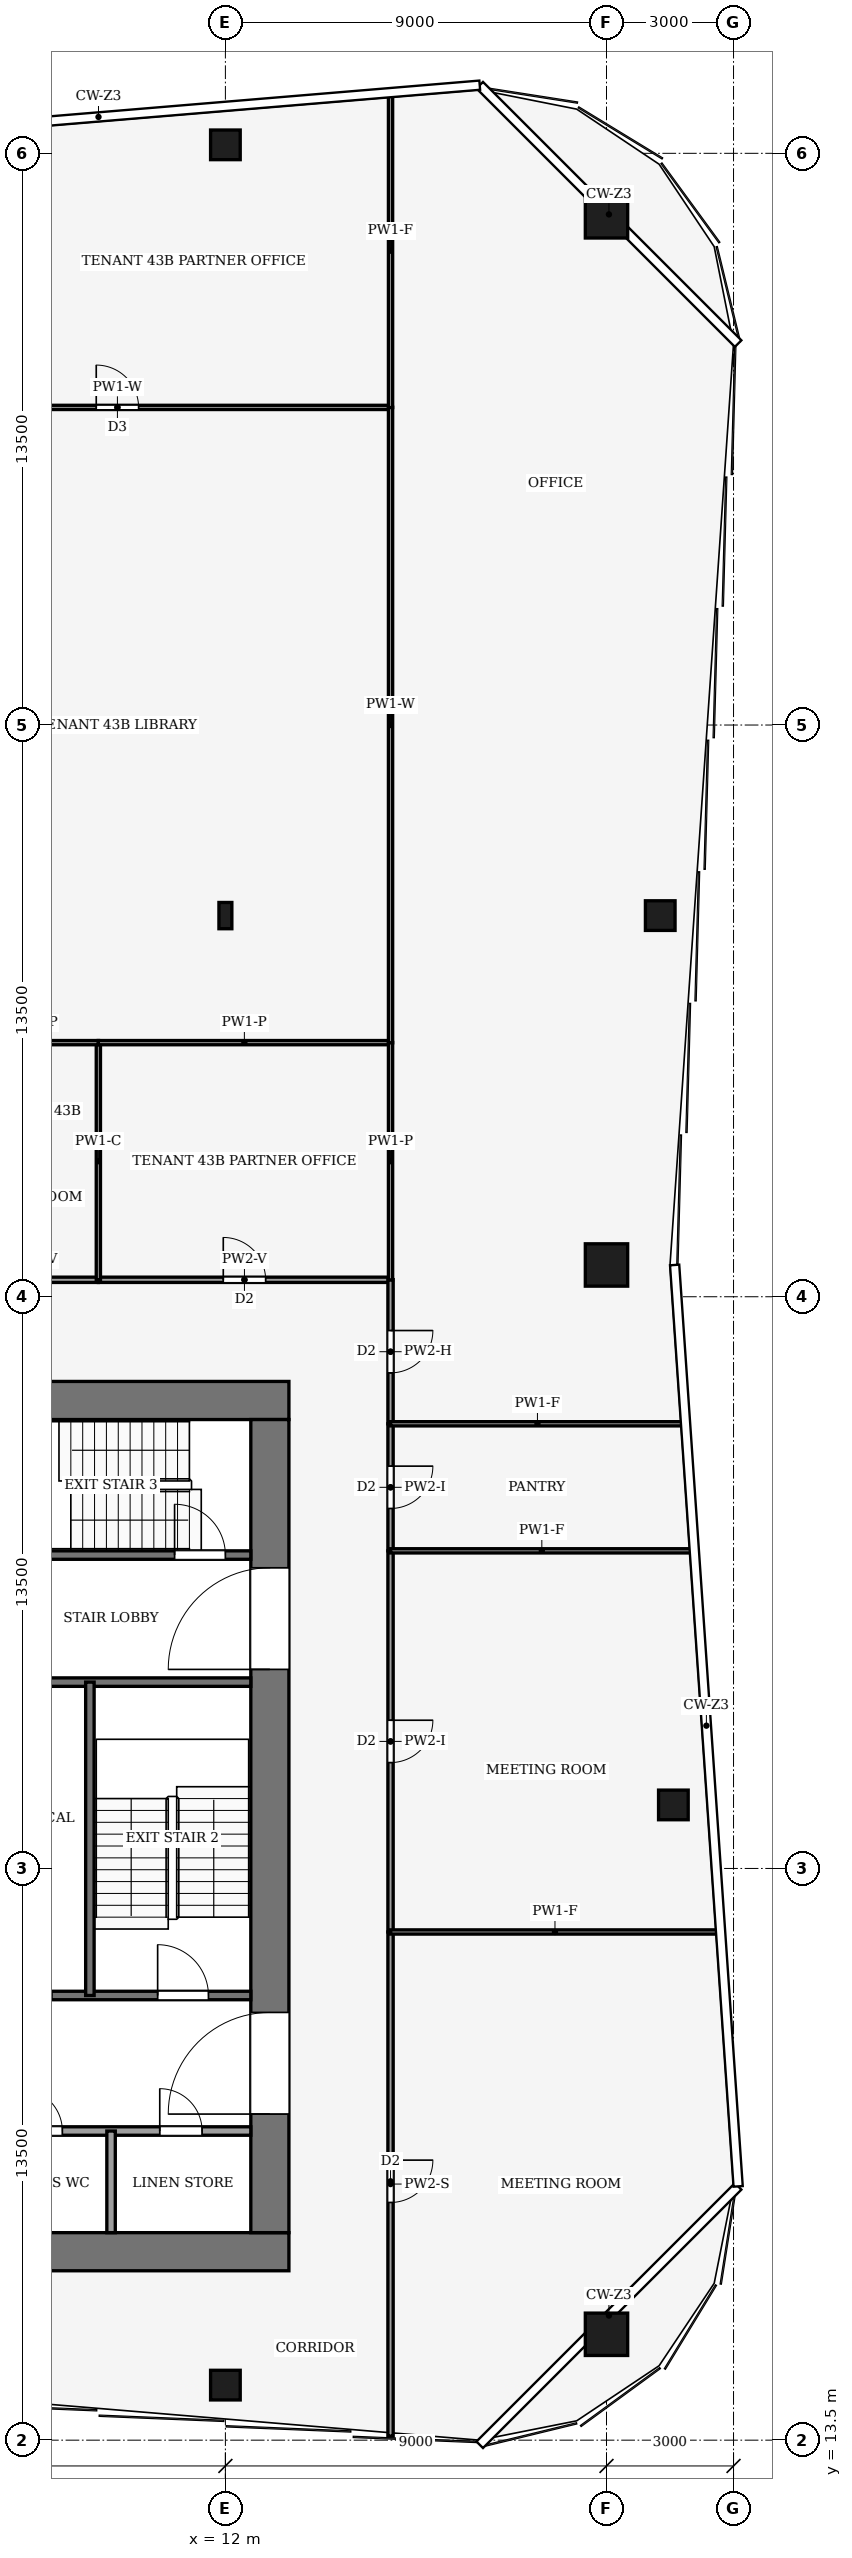
"""IFC4 building model, lengths in metres.
Left out: names, types, materials, properties, quantities, classifications, styles, units other than length and angle.
Written with IfcOpenShell. Run it as: python <this file> out.ifc"""

import sys

from ifc_helpers import new_model, si_unit, direction, frame, frame_2d, origin, origin_2d, place, context, subcontext, project, spatial, rectangle, hollow_rectangle, i_section, extrude, element, fill, save


model = new_model("IFC4")
c1 = context("Model", 3, precision=1e-05, world=origin(), true_north=direction((0.0, 1.0)))
c2 = subcontext(c1, "Body", "Model", "MODEL_VIEW")
j1 = project(units=[si_unit("LENGTHUNIT", "METRE"), si_unit("PLANEANGLEUNIT", "RADIAN")], contexts=[c1])
p1 = place(None, origin())
s1 = spatial("IfcSite", under=j1, at=p1, CompositionType="ELEMENT")
p2 = place(p1, origin())
s2 = spatial("IfcBuilding", under=s1, at=p2, CompositionType="ELEMENT")
p3 = place(p2, frame((0.0, 0.0, 190.0)))
s3 = spatial("IfcBuildingStorey", under=s2, at=p3, CompositionType="ELEMENT", Elevation=190.0)
for number, where, z_axis, x_axis in (
    (1, (-13.5, 17.95, -0.13), (0.0, 0.0, 1.0), (1.0, 0.0, 0.0)),
    (2, (-13.5, 38.05, -0.13), (0.0, 0.0, 1.0), (1.0, 0.0, 0.0)),
):
    element("IfcWall", number, at=place(p3, frame(where, z_axis=z_axis, x_axis=x_axis)), inside=s3, PredefinedType="SHEAR", context=c2, shape_type="SweptSolid", body=[
        extrude(rectangle(XDim=27.0, YDim=0.9, at=frame_2d((13.5, 0.0))), origin(), (0.0, 0.0, 1.0), 4.0),
    ])
p4 = place(p3, frame((13.05, 18.4, -0.13), z_axis=(0.0, 0.0, 1.0), x_axis=(0.0, 1.0, 0.0)))
e3 = element("IfcWall", 3, at=p4, inside=s3, PredefinedType="SHEAR", context=c2, shape_type="SweptSolid", body=[
    extrude(rectangle(XDim=19.2, YDim=0.9, at=frame_2d((9.6, 0.0))), origin(), (0.0, 0.0, 1.0), 4.0),
])
p5 = place(p4, frame((2.8, 0.0, 0.13)))
e4 = element("IfcOpeningElement", 4, at=p5, cuts=e3, PredefinedType="OPENING", context=c2, shape_type="SweptSolid", body=[
    extrude(rectangle(XDim=2.4, YDim=2.4, at=frame_2d((1.2, 1.2))), frame((0.0, 0.46, 0.0), z_axis=(0.0, -1.0, 0.0), x_axis=(1.0, 0.0, 0.0)), (0.0, 0.0, 1.0), 0.92),
])
p6 = place(p4, frame((13.3, 0.0, 0.13)))
e5 = element("IfcOpeningElement", 5, at=p6, cuts=e3, PredefinedType="OPENING", context=c2, shape_type="SweptSolid", body=[
    extrude(rectangle(XDim=2.4, YDim=2.4, at=frame_2d((1.2, 1.2))), frame((0.0, 0.46, 0.0), z_axis=(0.0, -1.0, 0.0), x_axis=(1.0, 0.0, 0.0)), (0.0, 0.0, 1.0), 0.92),
])
for number, where, z_axis, x_axis in (
    (6, (21.0, 66.0, 0.0), (0.0, 0.0, 1.0), (1.0, 0.0, 0.0)),
    (7, (21.0, 41.25, 0.0), (0.0, 0.0, 1.0), (1.0, 0.0, 0.0)),
    (8, (21.0, 16.0, 0.0), (0.0, 0.0, 1.0), (1.0, 0.0, 0.0)),
):
    element("IfcColumn", number, at=place(p3, frame(where, z_axis=z_axis, x_axis=x_axis)), inside=s3, PredefinedType="COLUMN", context=c2, shape_type="SweptSolid", body=[
        extrude(hollow_rectangle(XDim=1.0, YDim=1.0, WallThickness=0.06, at=origin_2d()), origin(), (0.0, 0.0, 1.0), 4.0),
    ])
for number, where, z_axis, x_axis in (
    (9, (12.0, 67.7, 0.0), (0.0, 0.0, 1.0), (1.0, 0.0, 0.0)),
    (10, (12.0, 14.8, 0.0), (0.0, 0.0, 1.0), (1.0, 0.0, 0.0)),
    (11, (22.579, 28.5, 0.0), (0.0, 0.0, 1.0), (1.0, 0.0, 0.0)),
    (12, (22.269, 49.5, 0.0), (0.0, 0.0, 1.0), (1.0, 0.0, 0.0)),
):
    element("IfcColumn", number, at=place(p3, frame(where, z_axis=z_axis, x_axis=x_axis)), inside=s3, PredefinedType="COLUMN", context=c2, shape_type="SweptSolid", body=[
        extrude(hollow_rectangle(XDim=0.7, YDim=0.7, WallThickness=0.03, at=origin_2d()), origin(), (0.0, 0.0, 1.0), 4.0),
    ])
p7 = place(p3, frame((12.0, 49.5, 0.0), z_axis=(0.0, 0.0, 1.0), x_axis=(1.0, 0.0, 0.0)))
e13 = element("IfcColumn", 13, at=p7, inside=s3, PredefinedType="COLUMN", context=c2, shape_type="SweptSolid", body=[
    extrude(i_section(OverallWidth=0.305, OverallDepth=0.62, WebThickness=0.021, FlangeThickness=0.04, FilletRadius=0.027, at=origin_2d()), origin(), (0.0, 0.0, 1.0), 4.0),
])
p8 = place(p3, frame((6.0, 20.8, 0.0), z_axis=(0.0, 0.0, 1.0), x_axis=(1.0, 0.0, 0.0)))
e14 = element("IfcWall", 14, at=p8, inside=s3, PredefinedType="PARTITIONING", context=c2, shape_type="SweptSolid", body=[
    extrude(rectangle(XDim=6.6, YDim=0.2, at=frame_2d((3.3, 0.0))), origin(), (0.0, 0.0, 1.0), 3.87),
])
p9 = place(p8, frame((1.15, 0.0, 0.0)))
e15 = element("IfcOpeningElement", 15, at=p9, cuts=e14, PredefinedType="OPENING", context=c2, shape_type="SweptSolid", body=[
    extrude(rectangle(XDim=1.0, YDim=2.1, at=frame_2d((0.5, 1.05))), frame((0.0, 0.11, 0.0), z_axis=(0.0, -1.0, 0.0), x_axis=(1.0, 0.0, 0.0)), (0.0, 0.0, 1.0), 0.22),
])
p10 = place(p8, frame((4.45, 0.0, 0.0)))
e16 = element("IfcOpeningElement", 16, at=p10, cuts=e14, PredefinedType="OPENING", context=c2, shape_type="SweptSolid", body=[
    extrude(rectangle(XDim=1.0, YDim=2.1, at=frame_2d((0.5, 1.05))), frame((0.0, 0.11, 0.0), z_axis=(0.0, -1.0, 0.0), x_axis=(1.0, 0.0, 0.0)), (0.0, 0.0, 1.0), 0.22),
])
p11 = place(p3, frame((6.0, 24.0, 0.0), z_axis=(0.0, 0.0, 1.0), x_axis=(1.0, 0.0, 0.0)))
e17 = element("IfcWall", 17, at=p11, inside=s3, PredefinedType="PARTITIONING", context=c2, shape_type="SweptSolid", body=[
    extrude(rectangle(XDim=6.6, YDim=0.2, at=frame_2d((3.3, 0.0))), origin(), (0.0, 0.0, 1.0), 3.87),
])
p12 = place(p11, frame((0.9, 0.0, 0.0)))
e18 = element("IfcOpeningElement", 18, at=p12, cuts=e17, PredefinedType="OPENING", context=c2, shape_type="SweptSolid", body=[
    extrude(rectangle(XDim=1.0, YDim=2.1, at=frame_2d((0.5, 1.05))), frame((0.0, 0.11, 0.0), z_axis=(0.0, -1.0, 0.0), x_axis=(1.0, 0.0, 0.0)), (0.0, 0.0, 1.0), 0.22),
])
p13 = place(p11, frame((4.4, 0.0, 0.0)))
e19 = element("IfcOpeningElement", 19, at=p13, cuts=e17, PredefinedType="OPENING", context=c2, shape_type="SweptSolid", body=[
    extrude(rectangle(XDim=1.2, YDim=2.2, at=frame_2d((0.6, 1.1))), frame((0.0, 0.11, 0.0), z_axis=(0.0, -1.0, 0.0), x_axis=(1.0, 0.0, 0.0)), (0.0, 0.0, 1.0), 0.22),
])
p14 = place(p3, frame((6.0, 31.4, 0.0), z_axis=(0.0, 0.0, 1.0), x_axis=(1.0, 0.0, 0.0)))
e20 = element("IfcWall", 20, at=p14, inside=s3, PredefinedType="PARTITIONING", context=c2, shape_type="SweptSolid", body=[
    extrude(rectangle(XDim=6.6, YDim=0.2, at=frame_2d((3.3, 0.0))), origin(), (0.0, 0.0, 1.0), 3.87),
])
p15 = place(p3, frame((6.0, 34.4, 0.0), z_axis=(0.0, 0.0, 1.0), x_axis=(1.0, 0.0, 0.0)))
e21 = element("IfcWall", 21, at=p15, inside=s3, PredefinedType="PARTITIONING", context=c2, shape_type="SweptSolid", body=[
    extrude(rectangle(XDim=6.6, YDim=0.2, at=frame_2d((3.3, 0.0))), origin(), (0.0, 0.0, 1.0), 3.87),
])
p16 = place(p15, frame((4.8, 0.0, 0.0)))
e22 = element("IfcOpeningElement", 22, at=p16, cuts=e21, PredefinedType="OPENING", context=c2, shape_type="SweptSolid", body=[
    extrude(rectangle(XDim=1.2, YDim=2.2, at=frame_2d((0.6, 1.1))), frame((0.0, 0.11, 0.0), z_axis=(0.0, -1.0, 0.0), x_axis=(1.0, 0.0, 0.0)), (0.0, 0.0, 1.0), 0.22),
])
p17 = place(p3, frame((8.8, 24.0, 0.0), z_axis=(0.0, 0.0, 1.0), x_axis=(0.0, 1.0, 0.0)))
e23 = element("IfcWall", 23, at=p17, inside=s3, PredefinedType="PARTITIONING", context=c2, shape_type="SweptSolid", body=[
    extrude(rectangle(XDim=7.4, YDim=0.2, at=frame_2d((3.7, 0.0))), origin(), (0.0, 0.0, 1.0), 3.87),
])
p18 = place(p3, frame((9.3, 18.4, 0.0), z_axis=(0.0, 0.0, 1.0), x_axis=(0.0, 1.0, 0.0)))
e24 = element("IfcWall", 24, at=p18, inside=s3, PredefinedType="PARTITIONING", context=c2, shape_type="SweptSolid", body=[
    extrude(rectangle(XDim=2.4, YDim=0.2, at=frame_2d((1.2, 0.0))), origin(), (0.0, 0.0, 1.0), 3.87),
])
p19 = place(p3, frame((9.0, 40.9, 0.0), z_axis=(0.0, 0.0, 1.0), x_axis=(-1.0, 0.0, 0.0)))
e25 = element("IfcWall", 25, at=p19, inside=s3, PredefinedType="PARTITIONING", context=c2, shape_type="SweptSolid", body=[
    extrude(rectangle(XDim=3.0, YDim=0.125, at=frame_2d((1.5, 0.0))), origin(), (0.0, 0.0, 1.0), 3.44),
])
p20 = place(p3, frame((9.0, 40.9, 0.0), z_axis=(0.0, 0.0, 1.0), x_axis=(1.0, 0.0, 0.0)))
e26 = element("IfcWall", 26, at=p20, inside=s3, PredefinedType="PARTITIONING", context=c2, shape_type="SweptSolid", body=[
    extrude(rectangle(XDim=6.9, YDim=0.125, at=frame_2d((3.45, 0.0))), origin(), (0.0, 0.0, 1.0), 3.44),
])
p21 = place(p20, frame((2.95, 0.0, 0.0)))
e27 = element("IfcOpeningElement", 27, at=p21, cuts=e26, PredefinedType="OPENING", context=c2, shape_type="SweptSolid", body=[
    extrude(rectangle(XDim=1.0, YDim=2.1, at=frame_2d((0.5, 1.05))), frame((0.0, 0.073, 0.0), z_axis=(0.0, -1.0, 0.0), x_axis=(1.0, 0.0, 0.0)), (0.0, 0.0, 1.0), 0.145),
])
p22 = place(p3, frame((15.9, 25.5, 0.0), z_axis=(0.0, 0.0, 1.0), x_axis=(0.0, -1.0, 0.0)))
e28 = element("IfcWall", 28, at=p22, inside=s3, PredefinedType="PARTITIONING", context=c2, shape_type="SweptSolid", body=[
    extrude(rectangle(XDim=11.905, YDim=0.125, at=frame_2d((5.953, 0.0))), origin(), (0.0, 0.0, 1.0), 3.04),
])
p23 = place(p22, frame((5.387, 0.0, 0.0)))
e29 = element("IfcOpeningElement", 29, at=p23, cuts=e28, PredefinedType="OPENING", context=c2, shape_type="SweptSolid", body=[
    extrude(rectangle(XDim=1.0, YDim=2.1, at=frame_2d((0.5, 1.05))), frame((0.0, 0.073, 0.0), z_axis=(0.0, -1.0, 0.0), x_axis=(1.0, 0.0, 0.0)), (0.0, 0.0, 1.0), 0.145),
])
p24 = place(p3, frame((15.9, 34.5, 0.0), z_axis=(0.0, 0.0, 1.0), x_axis=(0.0, -1.0, 0.0)))
e30 = element("IfcWall", 30, at=p24, inside=s3, PredefinedType="PARTITIONING", context=c2, shape_type="SweptSolid", body=[
    extrude(rectangle(XDim=9.0, YDim=0.125, at=frame_2d((4.5, 0.0))), origin(), (0.0, 0.0, 1.0), 3.48),
])
p25 = place(p24, frame((4.0, 0.0, 0.0)))
e31 = element("IfcOpeningElement", 31, at=p25, cuts=e30, PredefinedType="OPENING", context=c2, shape_type="SweptSolid", body=[
    extrude(rectangle(XDim=1.0, YDim=2.1, at=frame_2d((0.5, 1.05))), frame((0.0, 0.073, 0.0), z_axis=(0.0, -1.0, 0.0), x_axis=(1.0, 0.0, 0.0)), (0.0, 0.0, 1.0), 0.145),
])
p26 = place(p3, frame((15.9, 37.5, 0.0), z_axis=(0.0, 0.0, 1.0), x_axis=(0.0, -1.0, 0.0)))
e32 = element("IfcWall", 32, at=p26, inside=s3, PredefinedType="PARTITIONING", context=c2, shape_type="SweptSolid", body=[
    extrude(rectangle(XDim=3.0, YDim=0.125, at=frame_2d((1.5, 0.0))), origin(), (0.0, 0.0, 1.0), 3.48),
])
p27 = place(p26, frame((1.0, 0.0, 0.0)))
e33 = element("IfcOpeningElement", 33, at=p27, cuts=e32, PredefinedType="OPENING", context=c2, shape_type="SweptSolid", body=[
    extrude(rectangle(XDim=1.0, YDim=2.1, at=frame_2d((0.5, 1.05))), frame((0.0, 0.073, 0.0), z_axis=(0.0, -1.0, 0.0), x_axis=(1.0, 0.0, 0.0)), (0.0, 0.0, 1.0), 0.145),
])
p28 = place(p3, frame((15.9, 40.904, 0.0), z_axis=(0.0, 0.0, 1.0), x_axis=(0.0, -1.0, 0.0)))
e34 = element("IfcWall", 34, at=p28, inside=s3, PredefinedType="PARTITIONING", context=c2, shape_type="SweptSolid", body=[
    extrude(rectangle(XDim=3.404, YDim=0.125, at=frame_2d((1.702, 0.0))), origin(), (0.0, 0.0, 1.0), 3.14),
])
p29 = place(p28, frame((1.202, 0.0, 0.0)))
e35 = element("IfcOpeningElement", 35, at=p29, cuts=e34, PredefinedType="OPENING", context=c2, shape_type="SweptSolid", body=[
    extrude(rectangle(XDim=1.0, YDim=2.1, at=frame_2d((0.5, 1.05))), frame((0.0, 0.073, 0.0), z_axis=(0.0, -1.0, 0.0), x_axis=(1.0, 0.0, 0.0)), (0.0, 0.0, 1.0), 0.145),
])
p30 = place(p3, frame((9.0, 40.9, 0.0), z_axis=(0.0, 0.0, 1.0), x_axis=(0.0, 1.0, 0.0)))
e36 = element("IfcWall", 36, at=p30, inside=s3, PredefinedType="PARTITIONING", context=c2, shape_type="SweptSolid", body=[
    extrude(rectangle(XDim=5.6, YDim=0.1, at=frame_2d((2.8, 0.0))), origin(), (0.0, 0.0, 1.0), 3.87),
])
p31 = place(p3, frame((9.004, 46.5, 0.0), z_axis=(0.0, 0.0, 1.0), x_axis=(-1.0, 0.0, 0.0)))
e37 = element("IfcWall", 37, at=p31, inside=s3, PredefinedType="PARTITIONING", context=c2, shape_type="SweptSolid", body=[
    extrude(rectangle(XDim=3.008, YDim=0.1, at=frame_2d((1.504, 0.0))), origin(), (0.0, 0.0, 1.0), 3.44),
])
p32 = place(p3, frame((15.9, 46.5, 0.0), z_axis=(0.0, 0.0, 1.0), x_axis=(-1.0, 0.0, 0.0)))
e38 = element("IfcWall", 38, at=p32, inside=s3, PredefinedType="PARTITIONING", context=c2, shape_type="SweptSolid", body=[
    extrude(rectangle(XDim=6.904, YDim=0.1, at=frame_2d((3.452, 0.0))), origin(), (0.0, 0.0, 1.0), 3.44),
])
p33 = place(p3, frame((15.9, 40.896, 0.0), z_axis=(0.0, 0.0, 1.0), x_axis=(0.0, 1.0, 0.0)))
e39 = element("IfcWall", 39, at=p33, inside=s3, PredefinedType="PARTITIONING", context=c2, shape_type="SweptSolid", body=[
    extrude(rectangle(XDim=5.608, YDim=0.1, at=frame_2d((2.804, 0.0))), origin(), (0.0, 0.0, 1.0), 3.44),
])
p34 = place(p3, frame((3.0, 61.5, 0.0), z_axis=(0.0, 0.0, 1.0), x_axis=(1.0, 0.0, 0.0)))
e40 = element("IfcWall", 40, at=p34, inside=s3, PredefinedType="PARTITIONING", context=c2, shape_type="SweptSolid", body=[
    extrude(rectangle(XDim=12.9, YDim=0.1, at=frame_2d((6.45, 0.0))), origin(), (0.0, 0.0, 1.0), 3.24),
])
p35 = place(p34, frame((5.95, 0.0, 0.0)))
e41 = element("IfcOpeningElement", 41, at=p35, cuts=e40, PredefinedType="OPENING", context=c2, shape_type="SweptSolid", body=[
    extrude(rectangle(XDim=1.0, YDim=2.1, at=frame_2d((0.5, 1.05))), frame((0.0, 0.06, 0.0), z_axis=(0.0, -1.0, 0.0), x_axis=(1.0, 0.0, 0.0)), (0.0, 0.0, 1.0), 0.12),
])
p36 = place(p3, frame((15.9, 46.496, 0.0), z_axis=(0.0, 0.0, 1.0), x_axis=(0.0, 1.0, 0.0)))
e42 = element("IfcWall", 42, at=p36, inside=s3, PredefinedType="PARTITIONING", context=c2, shape_type="SweptSolid", body=[
    extrude(rectangle(XDim=15.008, YDim=0.1, at=frame_2d((7.504, 0.0))), origin(), (0.0, 0.0, 1.0), 3.24),
])
p37 = place(p3, frame((15.9, 61.496, 0.0), z_axis=(0.0, 0.0, 1.0), x_axis=(0.0, 1.0, 0.0)))
e43 = element("IfcWall", 43, at=p37, inside=s3, PredefinedType="PARTITIONING", context=c2, shape_type="SweptSolid", body=[
    extrude(rectangle(XDim=7.409, YDim=0.1, at=frame_2d((3.705, 0.0))), origin(), (0.0, 0.0, 1.0), 3.04),
])
p38 = place(p3, frame((23.666, 25.5, 0.0), z_axis=(0.0, 0.0, 1.0), x_axis=(-1.0, 0.0, 0.0)))
e44 = element("IfcWall", 44, at=p38, inside=s3, PredefinedType="PARTITIONING", context=c2, shape_type="SweptSolid", body=[
    extrude(rectangle(XDim=7.766, YDim=0.1, at=frame_2d((3.883, 0.0))), origin(), (0.0, 0.0, 1.0), 3.04),
])
p39 = place(p3, frame((23.045, 34.5, 0.0), z_axis=(0.0, 0.0, 1.0), x_axis=(-1.0, 0.0, 0.0)))
e45 = element("IfcWall", 45, at=p39, inside=s3, PredefinedType="PARTITIONING", context=c2, shape_type="SweptSolid", body=[
    extrude(rectangle(XDim=7.146, YDim=0.1, at=frame_2d((3.573, 0.0))), origin(), (0.0, 0.0, 1.0), 3.04),
])
p40 = place(p3, frame((22.839, 37.5, 0.0), z_axis=(0.0, 0.0, 1.0), x_axis=(-1.0, 0.0, 0.0)))
e46 = element("IfcWall", 46, at=p40, inside=s3, PredefinedType="PARTITIONING", context=c2, shape_type="SweptSolid", body=[
    extrude(rectangle(XDim=6.939, YDim=0.1, at=frame_2d((3.469, 0.0))), origin(), (0.0, 0.0, 1.0), 3.04),
])
p41 = place(p9, origin())
e47 = element("IfcDoor", 47, at=p41, inside=s3, OperationType="SINGLE_SWING_LEFT", PredefinedType="DOOR", context=c2, shape_type="SweptSolid", body=[
    extrude(rectangle(XDim=1.0, YDim=2.1, at=frame_2d((0.5, 1.05))), frame((0.0, 0.025, 0.0), z_axis=(0.0, -1.0, 0.0), x_axis=(1.0, 0.0, 0.0)), (0.0, 0.0, 1.0), 0.05),
])
fill(e15, e47)
p42 = place(p10, origin())
e48 = element("IfcDoor", 48, at=p42, inside=s3, OperationType="SINGLE_SWING_LEFT", PredefinedType="DOOR", context=c2, shape_type="SweptSolid", body=[
    extrude(rectangle(XDim=1.0, YDim=2.1, at=frame_2d((0.5, 1.05))), frame((0.0, 0.025, 0.0), z_axis=(0.0, -1.0, 0.0), x_axis=(1.0, 0.0, 0.0)), (0.0, 0.0, 1.0), 0.05),
])
fill(e16, e48)
p43 = place(p13, origin())
e49 = element("IfcDoor", 49, at=p43, inside=s3, OperationType="SINGLE_SWING_LEFT", PredefinedType="DOOR", context=c2, shape_type="SweptSolid", body=[
    extrude(rectangle(XDim=1.2, YDim=2.2, at=frame_2d((0.6, 1.1))), frame((0.0, 0.025, 0.0), z_axis=(0.0, -1.0, 0.0), x_axis=(1.0, 0.0, 0.0)), (0.0, 0.0, 1.0), 0.05),
])
fill(e19, e49)
p44 = place(p16, origin())
e50 = element("IfcDoor", 50, at=p44, inside=s3, OperationType="SINGLE_SWING_RIGHT", PredefinedType="DOOR", context=c2, shape_type="SweptSolid", body=[
    extrude(rectangle(XDim=1.2, YDim=2.2, at=frame_2d((0.6, 1.1))), frame((0.0, 0.025, 0.0), z_axis=(0.0, -1.0, 0.0), x_axis=(1.0, 0.0, 0.0)), (0.0, 0.0, 1.0), 0.05),
])
fill(e22, e50)
p45 = place(p5, origin())
e51 = element("IfcDoor", 51, at=p45, inside=s3, OperationType="DOUBLE_DOOR_SINGLE_SWING", PredefinedType="DOOR", context=c2, shape_type="SweptSolid", body=[
    extrude(rectangle(XDim=2.4, YDim=2.4, at=frame_2d((1.2, 1.2))), frame((0.0, 0.025, 0.0), z_axis=(0.0, -1.0, 0.0), x_axis=(1.0, 0.0, 0.0)), (0.0, 0.0, 1.0), 0.05),
])
fill(e4, e51)
p46 = place(p6, origin())
e52 = element("IfcDoor", 52, at=p46, inside=s3, OperationType="DOUBLE_DOOR_SINGLE_SWING", PredefinedType="DOOR", context=c2, shape_type="SweptSolid", body=[
    extrude(rectangle(XDim=2.4, YDim=2.4, at=frame_2d((1.2, 1.2))), frame((0.0, 0.025, 0.0), z_axis=(0.0, -1.0, 0.0), x_axis=(1.0, 0.0, 0.0)), (0.0, 0.0, 1.0), 0.05),
])
fill(e5, e52)
p47 = place(p21, origin())
e53 = element("IfcDoor", 53, at=p47, inside=s3, OperationType="SINGLE_SWING_RIGHT", PredefinedType="DOOR", context=c2, shape_type="SweptSolid", body=[
    extrude(rectangle(XDim=1.0, YDim=2.1, at=frame_2d((0.5, 1.05))), frame((0.0, 0.025, 0.0), z_axis=(0.0, -1.0, 0.0), x_axis=(1.0, 0.0, 0.0)), (0.0, 0.0, 1.0), 0.05),
])
fill(e27, e53)
p48 = place(p23, origin())
e54 = element("IfcDoor", 54, at=p48, inside=s3, OperationType="SINGLE_SWING_LEFT", PredefinedType="DOOR", context=c2, shape_type="SweptSolid", body=[
    extrude(rectangle(XDim=1.0, YDim=2.1, at=frame_2d((0.5, 1.05))), frame((0.0, 0.025, 0.0), z_axis=(0.0, -1.0, 0.0), x_axis=(1.0, 0.0, 0.0)), (0.0, 0.0, 1.0), 0.05),
])
fill(e29, e54)
p49 = place(p25, origin())
e55 = element("IfcDoor", 55, at=p49, inside=s3, OperationType="SINGLE_SWING_LEFT", PredefinedType="DOOR", context=c2, shape_type="SweptSolid", body=[
    extrude(rectangle(XDim=1.0, YDim=2.1, at=frame_2d((0.5, 1.05))), frame((0.0, 0.025, 0.0), z_axis=(0.0, -1.0, 0.0), x_axis=(1.0, 0.0, 0.0)), (0.0, 0.0, 1.0), 0.05),
])
fill(e31, e55)
p50 = place(p27, origin())
e56 = element("IfcDoor", 56, at=p50, inside=s3, OperationType="SINGLE_SWING_RIGHT", PredefinedType="DOOR", context=c2, shape_type="SweptSolid", body=[
    extrude(rectangle(XDim=1.0, YDim=2.1, at=frame_2d((0.5, 1.05))), frame((0.0, 0.025, 0.0), z_axis=(0.0, -1.0, 0.0), x_axis=(1.0, 0.0, 0.0)), (0.0, 0.0, 1.0), 0.05),
])
fill(e33, e56)
p51 = place(p29, origin())
e57 = element("IfcDoor", 57, at=p51, inside=s3, OperationType="SINGLE_SWING_LEFT", PredefinedType="DOOR", context=c2, shape_type="SweptSolid", body=[
    extrude(rectangle(XDim=1.0, YDim=2.1, at=frame_2d((0.5, 1.05))), frame((0.0, 0.025, 0.0), z_axis=(0.0, -1.0, 0.0), x_axis=(1.0, 0.0, 0.0)), (0.0, 0.0, 1.0), 0.05),
])
fill(e35, e57)
p52 = place(p35, origin())
e58 = element("IfcDoor", 58, at=p52, inside=s3, OperationType="SINGLE_SWING_RIGHT", PredefinedType="DOOR", context=c2, shape_type="SweptSolid", body=[
    extrude(rectangle(XDim=1.0, YDim=2.1, at=frame_2d((0.5, 1.05))), frame((0.0, 0.025, 0.0), z_axis=(0.0, -1.0, 0.0), x_axis=(1.0, 0.0, 0.0)), (0.0, 0.0, 1.0), 0.05),
])
fill(e41, e58)
save(model, sys.argv[1])
